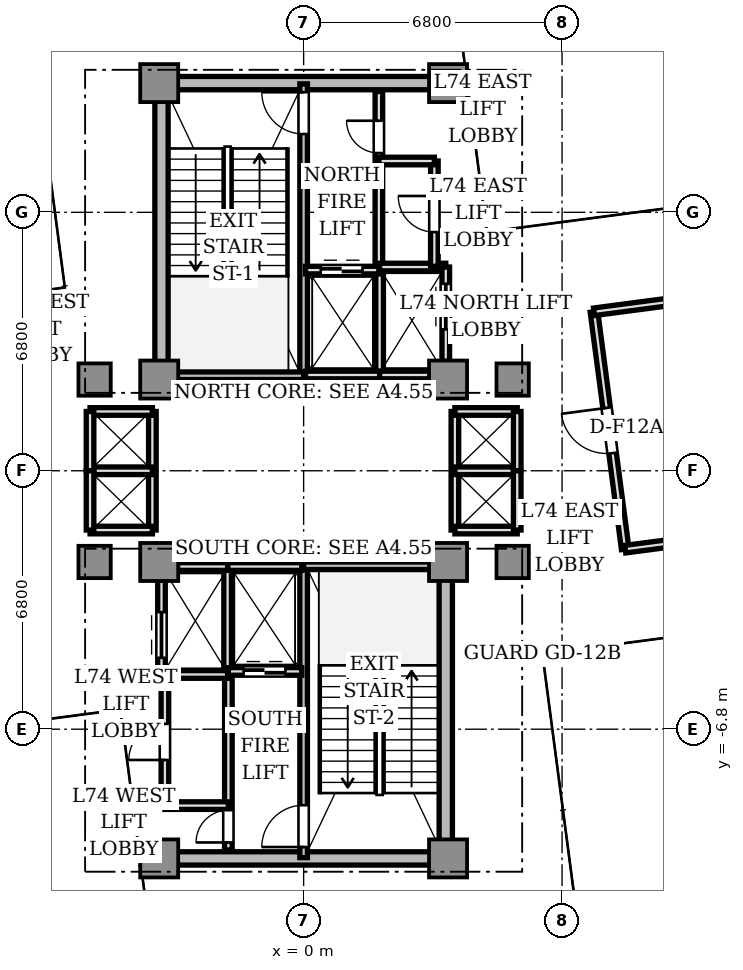
"""IFC4 building model, lengths in metres.
Left out: names, types, materials, properties, quantities, classifications, styles, units other than length and angle.
Written with IfcOpenShell. Run it as: python <this file> out.ifc"""

import sys

from ifc_helpers import new_model, si_unit, direction, frame, frame_2d, origin, origin_2d, place, context, subcontext, project, spatial, rectangle, extrude, source, transform, mapped, element, fill, save


model = new_model("IFC4")
c1 = context("Model", 3, precision=1e-05, world=origin(), true_north=direction((0.0, 1.0)))
c2 = subcontext(c1, "Body", "Model", "MODEL_VIEW")
j1 = project(units=[si_unit("LENGTHUNIT", "METRE"), si_unit("PLANEANGLEUNIT", "RADIAN")], contexts=[c1])
p1 = place(None, origin())
s1 = spatial("IfcSite", under=j1, at=p1, CompositionType="ELEMENT")
p2 = place(p1, origin())
s2 = spatial("IfcBuilding", under=s1, at=p2, CompositionType="ELEMENT")
p3 = place(p2, frame((0.0, 0.0, 264.6)))
s3 = spatial("IfcBuildingStorey", under=s2, at=p3, CompositionType="ELEMENT", Elevation=264.6)
p4 = place(p3, frame((-3.55, 10.2, 0.0), z_axis=(0.0, 0.0, 1.0), x_axis=(1.0, 0.0, 0.0)))
e1 = element("IfcWall", 1, at=p4, inside=s3, PredefinedType="SHEAR", context=c2, shape_type="SweptSolid", body=[
    extrude(rectangle(XDim=7.1, YDim=0.35, at=frame_2d((3.55, 0.0))), origin(), (0.0, 0.0, 1.0), 4.26),
])
p5 = place(p3, frame((-3.74, 2.85, 0.0), z_axis=(0.0, 0.0, 1.0), x_axis=(0.0, 1.0, 0.0)))
e2 = element("IfcWall", 2, at=p5, inside=s3, PredefinedType="SHEAR", context=c2, shape_type="SweptSolid", body=[
    extrude(rectangle(XDim=6.9, YDim=0.35, at=frame_2d((3.45, 0.0))), origin(), (0.0, 0.0, 1.0), 4.26),
])
p6 = place(p3, frame((-3.55, -10.2, 0.0), z_axis=(0.0, 0.0, 1.0), x_axis=(1.0, 0.0, 0.0)))
e3 = element("IfcWall", 3, at=p6, inside=s3, PredefinedType="SHEAR", context=c2, shape_type="SweptSolid", body=[
    extrude(rectangle(XDim=7.1, YDim=0.35, at=frame_2d((3.55, 0.0))), origin(), (0.0, 0.0, 1.0), 4.26),
])
p7 = place(p3, frame((3.74, -9.75, 0.0), z_axis=(0.0, 0.0, 1.0), x_axis=(0.0, 1.0, 0.0)))
e4 = element("IfcWall", 4, at=p7, inside=s3, PredefinedType="SHEAR", context=c2, shape_type="SweptSolid", body=[
    extrude(rectangle(XDim=6.9, YDim=0.35, at=frame_2d((3.45, 0.0))), origin(), (0.0, 0.0, 1.0), 4.26),
])
m1 = source(origin(), c2, "Body", "SweptSolid", [
    extrude(rectangle(XDim=1.0, YDim=1.0, at=origin_2d()), origin(), (0.0, 0.0, 1.0), 4.26),
])
for number, where, z_axis, x_axis in (
    (5, (-3.8, 2.4, 0.0), (0.0, 0.0, 1.0), (1.0, 0.0, 0.0)),
    (6, (3.8, 2.4, 0.0), (0.0, 0.0, 1.0), (1.0, 0.0, 0.0)),
    (7, (-3.8, 10.2, 0.0), (0.0, 0.0, 1.0), (1.0, 0.0, 0.0)),
    (8, (3.8, 10.2, 0.0), (0.0, 0.0, 1.0), (1.0, 0.0, 0.0)),
    (9, (-3.8, -2.4, 0.0), (0.0, 0.0, 1.0), (1.0, 0.0, 0.0)),
    (10, (3.8, -2.4, 0.0), (0.0, 0.0, 1.0), (1.0, 0.0, 0.0)),
    (11, (-3.8, -10.2, 0.0), (0.0, 0.0, 1.0), (1.0, 0.0, 0.0)),
    (12, (3.8, -10.2, 0.0), (0.0, 0.0, 1.0), (1.0, 0.0, 0.0)),
):
    element("IfcColumn", number, at=place(p3, frame(where, z_axis=z_axis, x_axis=x_axis)), inside=s3, PredefinedType="COLUMN", context=c2, shape_type="MappedRepresentation", body=[
        mapped(m1, transform((0.0, 0.0, 0.0), scale=1.0)),
    ])
m2 = source(origin(), c2, "Body", "SweptSolid", [
    extrude(rectangle(XDim=0.85, YDim=0.85, at=origin_2d()), origin(), (0.0, 0.0, 1.0), 4.26),
])
for number, where, z_axis, x_axis in (
    (13, (5.5, 2.4, 0.0), (0.0, 0.0, 1.0), (1.0, 0.0, 0.0)),
    (14, (-5.5, 2.4, 0.0), (0.0, 0.0, 1.0), (1.0, 0.0, 0.0)),
    (15, (5.5, -2.4, 0.0), (0.0, 0.0, 1.0), (1.0, 0.0, 0.0)),
    (16, (-5.5, -2.4, 0.0), (0.0, 0.0, 1.0), (1.0, 0.0, 0.0)),
):
    element("IfcColumn", number, at=place(p3, frame(where, z_axis=z_axis, x_axis=x_axis)), inside=s3, PredefinedType="COLUMN", context=c2, shape_type="MappedRepresentation", body=[
        mapped(m2, transform((0.0, 0.0, 0.0), scale=1.0)),
    ])
p8 = place(p3, frame((0.0, 2.5, 0.0), z_axis=(0.0, 0.0, 1.0), x_axis=(0.0, 1.0, 0.0)))
e17 = element("IfcWall", 17, at=p8, inside=s3, PredefinedType="SOLIDWALL", context=c2, shape_type="SweptSolid", body=[
    extrude(rectangle(XDim=7.68, YDim=0.2, at=frame_2d((3.84, 0.0))), origin(), (0.0, 0.0, 1.0), 4.26),
])
p9 = place(p8, frame((6.36, 0.0, 0.0)))
e18 = element("IfcOpeningElement", 18, at=p9, cuts=e17, PredefinedType="OPENING", context=c2, shape_type="SweptSolid", body=[
    extrude(rectangle(XDim=1.1, YDim=2.15, at=frame_2d((0.55, 1.075))), frame((0.0, 0.11, 0.0), z_axis=(0.0, -1.0, 0.0), x_axis=(1.0, 0.0, 0.0)), (0.0, 0.0, 1.0), 0.22),
])
p10 = place(p3, frame((-3.72, 2.5, 0.0), z_axis=(0.0, 0.0, 1.0), x_axis=(1.0, 0.0, 0.0)))
e19 = element("IfcWall", 19, at=p10, inside=s3, PredefinedType="SOLIDWALL", context=c2, shape_type="SweptSolid", body=[
    extrude(rectangle(XDim=3.72, YDim=0.2, at=frame_2d((1.86, 0.0))), origin(), (0.0, 0.0, 1.0), 4.26),
])
p11 = place(p3, frame((0.0, -10.18, 0.0), z_axis=(0.0, 0.0, 1.0), x_axis=(0.0, 1.0, 0.0)))
e20 = element("IfcWall", 20, at=p11, inside=s3, PredefinedType="SOLIDWALL", context=c2, shape_type="SweptSolid", body=[
    extrude(rectangle(XDim=7.68, YDim=0.2, at=frame_2d((3.84, 0.0))), origin(), (0.0, 0.0, 1.0), 4.26),
])
p12 = place(p11, frame((0.28, 0.0, 0.0)))
e21 = element("IfcOpeningElement", 21, at=p12, cuts=e20, PredefinedType="OPENING", context=c2, shape_type="SweptSolid", body=[
    extrude(rectangle(XDim=1.1, YDim=2.15, at=frame_2d((0.55, 1.075))), frame((0.0, 0.11, 0.0), z_axis=(0.0, -1.0, 0.0), x_axis=(1.0, 0.0, 0.0)), (0.0, 0.0, 1.0), 0.22),
])
p13 = place(p3, frame((0.0, -2.5, 0.0), z_axis=(0.0, 0.0, 1.0), x_axis=(1.0, 0.0, 0.0)))
e22 = element("IfcWall", 22, at=p13, inside=s3, PredefinedType="SOLIDWALL", context=c2, shape_type="SweptSolid", body=[
    extrude(rectangle(XDim=3.72, YDim=0.2, at=frame_2d((1.86, 0.0))), origin(), (0.0, 0.0, 1.0), 4.26),
])
p14 = place(p3, frame((1.98, 5.32, 0.0), z_axis=(0.0, 0.0, 1.0), x_axis=(0.0, 1.0, 0.0)))
e23 = element("IfcWall", 23, at=p14, inside=s3, PredefinedType="SOLIDWALL", context=c2, shape_type="SweptSolid", body=[
    extrude(rectangle(XDim=4.66, YDim=0.2, at=frame_2d((2.33, 0.0))), origin(), (0.0, 0.0, 1.0), 3.81),
])
p15 = place(p14, frame((3.04, 0.0, 0.0)))
e24 = element("IfcOpeningElement", 24, at=p15, cuts=e23, PredefinedType="OPENING", context=c2, shape_type="SweptSolid", body=[
    extrude(rectangle(XDim=0.85, YDim=2.1, at=frame_2d((0.425, 1.05))), frame((0.0, 0.11, 0.0), z_axis=(0.0, -1.0, 0.0), x_axis=(1.0, 0.0, 0.0)), (0.0, 0.0, 1.0), 0.22),
])
p16 = place(p3, frame((-1.98, -9.98, 0.0), z_axis=(0.0, 0.0, 1.0), x_axis=(0.0, 1.0, 0.0)))
e25 = element("IfcWall", 25, at=p16, inside=s3, PredefinedType="SOLIDWALL", context=c2, shape_type="SweptSolid", body=[
    extrude(rectangle(XDim=4.66, YDim=0.2, at=frame_2d((2.33, 0.0))), origin(), (0.0, 0.0, 1.0), 3.81),
])
p17 = place(p16, frame((0.2, 0.0, 0.0)))
e26 = element("IfcOpeningElement", 26, at=p17, cuts=e25, PredefinedType="OPENING", context=c2, shape_type="SweptSolid", body=[
    extrude(rectangle(XDim=0.85, YDim=2.1, at=frame_2d((0.425, 1.05))), frame((0.0, 0.11, 0.0), z_axis=(0.0, -1.0, 0.0), x_axis=(1.0, 0.0, 0.0)), (0.0, 0.0, 1.0), 0.22),
])
p18 = place(p3, frame((2.0, 2.5, 0.0), z_axis=(0.0, 0.0, 1.0), x_axis=(0.0, 1.0, 0.0)))
e27 = element("IfcWall", 27, at=p18, inside=s3, PredefinedType="SOLIDWALL", context=c2, shape_type="SweptSolid", body=[
    extrude(rectangle(XDim=2.78, YDim=0.2, at=frame_2d((1.39, 0.0))), origin(), (0.0, 0.0, 1.0), 3.81),
])
p19 = place(p3, frame((0.05, 2.52, 0.0), z_axis=(0.0, 0.0, 1.0), x_axis=(1.0, 0.0, 0.0)))
e28 = element("IfcWall", 28, at=p19, inside=s3, PredefinedType="SOLIDWALL", context=c2, shape_type="SweptSolid", body=[
    extrude(rectangle(XDim=1.95, YDim=0.2, at=frame_2d((0.975, 0.0))), origin(), (0.0, 0.0, 1.0), 3.81),
])
p20 = place(p3, frame((0.05, 5.28, 0.0), z_axis=(0.0, 0.0, 1.0), x_axis=(1.0, 0.0, 0.0)))
e29 = element("IfcWall", 29, at=p20, inside=s3, PredefinedType="SOLIDWALL", context=c2, shape_type="SweptSolid", body=[
    extrude(rectangle(XDim=1.93, YDim=0.2, at=frame_2d((0.965, 0.0))), origin(), (0.0, 0.0, 1.0), 3.81),
])
p21 = place(p20, frame((0.4, 0.0, 0.0)))
e30 = element("IfcOpeningElement", 30, at=p21, cuts=e29, PredefinedType="OPENING", context=c2, shape_type="SweptSolid", body=[
    extrude(rectangle(XDim=1.1, YDim=2.2, at=frame_2d((0.55, 1.1))), frame((0.0, 0.11, 0.0), z_axis=(0.0, -1.0, 0.0), x_axis=(1.0, 0.0, 0.0)), (0.0, 0.0, 1.0), 0.22),
])
p22 = place(p3, frame((-2.0, -5.28, 0.0), z_axis=(0.0, 0.0, 1.0), x_axis=(0.0, 1.0, 0.0)))
e31 = element("IfcWall", 31, at=p22, inside=s3, PredefinedType="SOLIDWALL", context=c2, shape_type="SweptSolid", body=[
    extrude(rectangle(XDim=2.78, YDim=0.2, at=frame_2d((1.39, 0.0))), origin(), (0.0, 0.0, 1.0), 3.81),
])
p23 = place(p3, frame((-2.0, -2.52, 0.0), z_axis=(0.0, 0.0, 1.0), x_axis=(1.0, 0.0, 0.0)))
e32 = element("IfcWall", 32, at=p23, inside=s3, PredefinedType="SOLIDWALL", context=c2, shape_type="SweptSolid", body=[
    extrude(rectangle(XDim=1.95, YDim=0.2, at=frame_2d((0.975, 0.0))), origin(), (0.0, 0.0, 1.0), 3.81),
])
p24 = place(p3, frame((-1.98, -5.28, 0.0), z_axis=(0.0, 0.0, 1.0), x_axis=(1.0, 0.0, 0.0)))
e33 = element("IfcWall", 33, at=p24, inside=s3, PredefinedType="SOLIDWALL", context=c2, shape_type="SweptSolid", body=[
    extrude(rectangle(XDim=1.93, YDim=0.2, at=frame_2d((0.965, 0.0))), origin(), (0.0, 0.0, 1.0), 3.81),
])
p25 = place(p24, frame((0.4, 0.0, 0.0)))
e34 = element("IfcOpeningElement", 34, at=p25, cuts=e33, PredefinedType="OPENING", context=c2, shape_type="SweptSolid", body=[
    extrude(rectangle(XDim=1.1, YDim=2.2, at=frame_2d((0.55, 1.1))), frame((0.0, 0.11, 0.0), z_axis=(0.0, -1.0, 0.0), x_axis=(1.0, 0.0, 0.0)), (0.0, 0.0, 1.0), 0.22),
])
p26 = place(p3, frame((2.0, 2.52, 0.0), z_axis=(0.0, 0.0, 1.0), x_axis=(1.0, 0.0, 0.0)))
e35 = element("IfcWall", 35, at=p26, inside=s3, PredefinedType="SOLIDWALL", context=c2, shape_type="SweptSolid", body=[
    extrude(rectangle(XDim=1.32, YDim=0.2, at=frame_2d((0.66, 0.0))), origin(), (0.0, 0.0, 1.0), 3.81),
])
p27 = place(p3, frame((2.0, 5.36, 0.0), z_axis=(0.0, 0.0, 1.0), x_axis=(1.0, 0.0, 0.0)))
e36 = element("IfcWall", 36, at=p27, inside=s3, PredefinedType="SOLIDWALL", context=c2, shape_type="SweptSolid", body=[
    extrude(rectangle(XDim=1.74, YDim=0.2, at=frame_2d((0.87, 0.0))), origin(), (0.0, 0.0, 1.0), 3.81),
])
p28 = place(p3, frame((3.74, 2.88, 0.0), z_axis=(0.0, 0.0, 1.0), x_axis=(0.0, 1.0, 0.0)))
e37 = element("IfcWall", 37, at=p28, inside=s3, PredefinedType="SOLIDWALL", context=c2, shape_type="SweptSolid", body=[
    extrude(rectangle(XDim=2.48, YDim=0.2, at=frame_2d((1.24, 0.0))), origin(), (0.0, 0.0, 1.0), 3.81),
])
p29 = place(p28, frame((0.84, 0.0, 0.0)))
e38 = element("IfcOpeningElement", 38, at=p29, cuts=e37, PredefinedType="OPENING", context=c2, shape_type="SweptSolid", body=[
    extrude(rectangle(XDim=1.2, YDim=2.2, at=frame_2d((0.6, 1.1))), frame((0.0, 0.11, 0.0), z_axis=(0.0, -1.0, 0.0), x_axis=(1.0, 0.0, 0.0)), (0.0, 0.0, 1.0), 0.22),
])
p30 = place(p3, frame((-3.32, -2.52, 0.0), z_axis=(0.0, 0.0, 1.0), x_axis=(1.0, 0.0, 0.0)))
e39 = element("IfcWall", 39, at=p30, inside=s3, PredefinedType="SOLIDWALL", context=c2, shape_type="SweptSolid", body=[
    extrude(rectangle(XDim=1.32, YDim=0.2, at=frame_2d((0.66, 0.0))), origin(), (0.0, 0.0, 1.0), 3.81),
])
p31 = place(p3, frame((-3.74, -5.36, 0.0), z_axis=(0.0, 0.0, 1.0), x_axis=(1.0, 0.0, 0.0)))
e40 = element("IfcWall", 40, at=p31, inside=s3, PredefinedType="SOLIDWALL", context=c2, shape_type="SweptSolid", body=[
    extrude(rectangle(XDim=1.74, YDim=0.2, at=frame_2d((0.87, 0.0))), origin(), (0.0, 0.0, 1.0), 3.81),
])
p32 = place(p3, frame((-3.74, -5.36, 0.0), z_axis=(0.0, 0.0, 1.0), x_axis=(0.0, 1.0, 0.0)))
e41 = element("IfcWall", 41, at=p32, inside=s3, PredefinedType="SOLIDWALL", context=c2, shape_type="SweptSolid", body=[
    extrude(rectangle(XDim=2.48, YDim=0.2, at=frame_2d((1.24, 0.0))), origin(), (0.0, 0.0, 1.0), 3.81),
])
p33 = place(p32, frame((0.44, 0.0, 0.0)))
e42 = element("IfcOpeningElement", 42, at=p33, cuts=e41, PredefinedType="OPENING", context=c2, shape_type="SweptSolid", body=[
    extrude(rectangle(XDim=1.2, YDim=2.2, at=frame_2d((0.6, 1.1))), frame((0.0, 0.11, 0.0), z_axis=(0.0, -1.0, 0.0), x_axis=(1.0, 0.0, 0.0)), (0.0, 0.0, 1.0), 0.22),
])
p34 = place(p3, frame((3.98, -1.56, 0.0), z_axis=(0.0, 0.0, 1.0), x_axis=(0.0, 1.0, 0.0)))
e43 = element("IfcWall", 43, at=p34, inside=s3, PredefinedType="SOLIDWALL", context=c2, shape_type="SweptSolid", body=[
    extrude(rectangle(XDim=3.12, YDim=0.2, at=frame_2d((1.56, 0.0))), origin(), (0.0, 0.0, 1.0), 3.48),
])
for number, where, z_axis, x_axis in (
    (44, (3.98, 1.56, 0.0), (0.0, 0.0, 1.0), (1.0, 0.0, 0.0)),
    (45, (3.98, -1.56, 0.0), (0.0, 0.0, 1.0), (1.0, 0.0, 0.0)),
    (46, (3.98, 0.0, 0.0), (0.0, 0.0, 1.0), (1.0, 0.0, 0.0)),
):
    element("IfcWall", number, at=place(p3, frame(where, z_axis=z_axis, x_axis=x_axis)), inside=s3, PredefinedType="SOLIDWALL", context=c2, shape_type="SweptSolid", body=[
        extrude(rectangle(XDim=1.64, YDim=0.2, at=frame_2d((0.82, 0.0))), origin(), (0.0, 0.0, 1.0), 3.81),
    ])
for number, where, z_axis, x_axis in (
    (47, (5.62, 0.0, 0.0), (0.0, 0.0, 1.0), (0.0, 1.0, 0.0)),
    (48, (5.62, -1.56, 0.0), (0.0, 0.0, 1.0), (0.0, 1.0, 0.0)),
):
    element("IfcWall", number, at=place(p3, frame(where, z_axis=z_axis, x_axis=x_axis)), inside=s3, PredefinedType="SOLIDWALL", context=c2, shape_type="SweptSolid", body=[
        extrude(rectangle(XDim=1.56, YDim=0.2, at=frame_2d((0.78, 0.0))), origin(), (0.0, 0.0, 1.0), 3.81),
    ])
p35 = place(p3, frame((-3.98, -1.56, 0.0), z_axis=(0.0, 0.0, 1.0), x_axis=(0.0, 1.0, 0.0)))
e49 = element("IfcWall", 49, at=p35, inside=s3, PredefinedType="SOLIDWALL", context=c2, shape_type="SweptSolid", body=[
    extrude(rectangle(XDim=3.12, YDim=0.2, at=frame_2d((1.56, 0.0))), origin(), (0.0, 0.0, 1.0), 3.48),
])
for number, where, z_axis, x_axis in (
    (50, (-5.62, 1.56, 0.0), (0.0, 0.0, 1.0), (1.0, 0.0, 0.0)),
    (51, (-5.62, -1.56, 0.0), (0.0, 0.0, 1.0), (1.0, 0.0, 0.0)),
    (52, (-5.62, 0.0, 0.0), (0.0, 0.0, 1.0), (1.0, 0.0, 0.0)),
):
    element("IfcWall", number, at=place(p3, frame(where, z_axis=z_axis, x_axis=x_axis)), inside=s3, PredefinedType="SOLIDWALL", context=c2, shape_type="SweptSolid", body=[
        extrude(rectangle(XDim=1.64, YDim=0.2, at=frame_2d((0.82, 0.0))), origin(), (0.0, 0.0, 1.0), 3.81),
    ])
for number, where, z_axis, x_axis in (
    (53, (-5.62, 0.0, 0.0), (0.0, 0.0, 1.0), (0.0, 1.0, 0.0)),
    (54, (-5.62, -1.56, 0.0), (0.0, 0.0, 1.0), (0.0, 1.0, 0.0)),
):
    element("IfcWall", number, at=place(p3, frame(where, z_axis=z_axis, x_axis=x_axis)), inside=s3, PredefinedType="SOLIDWALL", context=c2, shape_type="SweptSolid", body=[
        extrude(rectangle(XDim=1.56, YDim=0.2, at=frame_2d((0.78, 0.0))), origin(), (0.0, 0.0, 1.0), 3.81),
    ])
p36 = place(p3, frame((3.44, 5.38, 0.0), z_axis=(0.0, 0.0, 1.0), x_axis=(0.0, 1.0, 0.0)))
e55 = element("IfcWall", 55, at=p36, inside=s3, PredefinedType="SOLIDWALL", context=c2, shape_type="SweptSolid", body=[
    extrude(rectangle(XDim=2.77, YDim=0.2, at=frame_2d((1.385, 0.0))), origin(), (0.0, 0.0, 1.0), 3.81),
])
p37 = place(p36, frame((0.9, 0.0, 0.0)))
e56 = element("IfcOpeningElement", 56, at=p37, cuts=e55, PredefinedType="OPENING", context=c2, shape_type="SweptSolid", body=[
    extrude(rectangle(XDim=0.95, YDim=2.15, at=frame_2d((0.475, 1.075))), frame((0.0, 0.11, 0.0), z_axis=(0.0, -1.0, 0.0), x_axis=(1.0, 0.0, 0.0)), (0.0, 0.0, 1.0), 0.22),
])
p38 = place(p3, frame((1.98, 8.15, 0.0), z_axis=(0.0, 0.0, 1.0), x_axis=(1.0, 0.0, 0.0)))
e57 = element("IfcWall", 57, at=p38, inside=s3, PredefinedType="SOLIDWALL", context=c2, shape_type="SweptSolid", body=[
    extrude(rectangle(XDim=1.46, YDim=0.2, at=frame_2d((0.73, 0.0))), origin(), (0.0, 0.0, 1.0), 3.81),
])
p39 = place(p3, frame((-3.65, -8.81, 0.0), z_axis=(0.0, 0.0, 1.0), x_axis=(0.0, 1.0, 0.0)))
e58 = element("IfcWall", 58, at=p39, inside=s3, PredefinedType="SOLIDWALL", context=c2, shape_type="SweptSolid", body=[
    extrude(rectangle(XDim=3.43, YDim=0.2, at=frame_2d((1.715, 0.0))), origin(), (0.0, 0.0, 1.0), 3.81),
])
p40 = place(p39, frame((1.2, 0.0, 0.0)))
e59 = element("IfcOpeningElement", 59, at=p40, cuts=e58, PredefinedType="OPENING", context=c2, shape_type="SweptSolid", body=[
    extrude(rectangle(XDim=0.95, YDim=2.15, at=frame_2d((0.475, 1.075))), frame((0.0, 0.11, 0.0), z_axis=(0.0, -1.0, 0.0), x_axis=(1.0, 0.0, 0.0)), (0.0, 0.0, 1.0), 0.22),
])
p41 = place(p3, frame((-3.65, -8.81, 0.0), z_axis=(0.0, 0.0, 1.0), x_axis=(1.0, 0.0, 0.0)))
e60 = element("IfcWall", 60, at=p41, inside=s3, PredefinedType="SOLIDWALL", context=c2, shape_type="SweptSolid", body=[
    extrude(rectangle(XDim=1.67, YDim=0.2, at=frame_2d((0.835, 0.0))), origin(), (0.0, 0.0, 1.0), 3.81),
])
p42 = place(p3, frame((8.462, -2.063, 0.0), z_axis=(0.0, 0.0, 1.0), x_axis=(-0.130518669044, 0.99144585179, 0.0)))
e61 = element("IfcWall", 61, at=p42, inside=s3, PredefinedType="SOLIDWALL", context=c2, shape_type="SweptSolid", body=[
    extrude(rectangle(XDim=6.3, YDim=0.2, at=frame_2d((3.15, 0.0))), origin(), (0.0, 0.0, 1.0), 3.81),
])
p43 = place(p42, frame((2.55, 0.0, 0.0)))
e62 = element("IfcOpeningElement", 62, at=p43, cuts=e61, PredefinedType="OPENING", context=c2, shape_type="SweptSolid", body=[
    extrude(rectangle(XDim=1.2, YDim=2.2, at=frame_2d((0.6, 1.1))), frame((0.0, 0.11, 0.0), z_axis=(0.0, -1.0, 0.0), x_axis=(1.0, 0.0, 0.0)), (0.0, 0.0, 1.0), 0.22),
])
p44 = place(p3, frame((7.639, 4.183, 0.0), z_axis=(0.0, 0.0, 1.0), x_axis=(0.991443337312, 0.130537768098, 0.0)))
e63 = element("IfcWall", 63, at=p44, inside=s3, PredefinedType="SOLIDWALL", context=c2, shape_type="SweptSolid", body=[
    extrude(rectangle(XDim=8.42, YDim=0.2, at=frame_2d((4.21, 0.0))), origin(), (0.0, 0.0, 1.0), 3.81),
])
p45 = place(p3, frame((8.462, -2.063, 0.0), z_axis=(0.0, 0.0, 1.0), x_axis=(0.991443831377, 0.130534015583, 0.0)))
e64 = element("IfcWall", 64, at=p45, inside=s3, PredefinedType="SOLIDWALL", context=c2, shape_type="SweptSolid", body=[
    extrude(rectangle(XDim=8.42, YDim=0.2, at=frame_2d((4.21, 0.0))), origin(), (0.0, 0.0, 1.0), 3.81),
])
m3 = source(origin(), c2, "Body", "SweptSolid", [
    extrude(rectangle(XDim=1.1, YDim=0.05, at=origin_2d()), origin(), (0.0, 0.0, 1.0), 2.15),
])
p46 = place(p9, frame((0.55, 0.0, 0.0)))
e65 = element("IfcDoor", 65, at=p46, inside=s3, OperationType="SINGLE_SWING_RIGHT", PredefinedType="DOOR", context=c2, shape_type="MappedRepresentation", body=[
    mapped(m3, transform((0.0, 0.0, 0.0), scale=1.0)),
])
fill(e18, e65)
p47 = place(p12, frame((0.55, 0.0, 0.0)))
e66 = element("IfcDoor", 66, at=p47, inside=s3, OperationType="SINGLE_SWING_LEFT", PredefinedType="DOOR", context=c2, shape_type="MappedRepresentation", body=[
    mapped(m3, transform((0.0, 0.0, 0.0), scale=1.0)),
])
fill(e21, e66)
m4 = source(origin(), c2, "Body", "SweptSolid", [
    extrude(rectangle(XDim=0.85, YDim=0.05, at=origin_2d()), origin(), (0.0, 0.0, 1.0), 2.1),
])
p48 = place(p15, frame((0.425, 0.0, 0.0)))
e67 = element("IfcDoor", 67, at=p48, inside=s3, OperationType="SINGLE_SWING_RIGHT", PredefinedType="DOOR", context=c2, shape_type="MappedRepresentation", body=[
    mapped(m4, transform((0.0, 0.0, 0.0), scale=1.0)),
])
fill(e24, e67)
p49 = place(p17, frame((0.425, 0.0, 0.0)))
e68 = element("IfcDoor", 68, at=p49, inside=s3, OperationType="SINGLE_SWING_LEFT", PredefinedType="DOOR", context=c2, shape_type="MappedRepresentation", body=[
    mapped(m4, transform((0.0, 0.0, 0.0), scale=1.0)),
])
fill(e26, e68)
m5 = source(origin(), c2, "Body", "SweptSolid", [
    extrude(rectangle(XDim=1.1, YDim=0.05, at=origin_2d()), origin(), (0.0, 0.0, 1.0), 2.2),
])
p50 = place(p21, frame((0.55, 0.0, 0.0)))
e69 = element("IfcDoor", 69, at=p50, inside=s3, OperationType="DOUBLE_DOOR_SLIDING", PredefinedType="DOOR", context=c2, shape_type="MappedRepresentation", body=[
    mapped(m5, transform((0.0, 0.0, 0.0), scale=1.0)),
])
fill(e30, e69)
p51 = place(p25, frame((0.55, 0.0, 0.0)))
e70 = element("IfcDoor", 70, at=p51, inside=s3, OperationType="DOUBLE_DOOR_SLIDING", PredefinedType="DOOR", context=c2, shape_type="MappedRepresentation", body=[
    mapped(m5, transform((0.0, 0.0, 0.0), scale=1.0)),
])
fill(e34, e70)
m6 = source(origin(), c2, "Body", "SweptSolid", [
    extrude(rectangle(XDim=1.2, YDim=0.05, at=origin_2d()), origin(), (0.0, 0.0, 1.0), 2.2),
])
p52 = place(p29, frame((0.6, 0.0, 0.0)))
e71 = element("IfcDoor", 71, at=p52, inside=s3, OperationType="DOUBLE_DOOR_SLIDING", PredefinedType="DOOR", context=c2, shape_type="MappedRepresentation", body=[
    mapped(m6, transform((0.0, 0.0, 0.0), scale=1.0)),
])
fill(e38, e71)
p53 = place(p33, frame((0.6, 0.0, 0.0)))
e72 = element("IfcDoor", 72, at=p53, inside=s3, OperationType="DOUBLE_DOOR_SLIDING", PredefinedType="DOOR", context=c2, shape_type="MappedRepresentation", body=[
    mapped(m6, transform((0.0, 0.0, 0.0), scale=1.0)),
])
fill(e42, e72)
m7 = source(origin(), c2, "Body", "SweptSolid", [
    extrude(rectangle(XDim=0.95, YDim=0.05, at=origin_2d()), origin(), (0.0, 0.0, 1.0), 2.15),
])
p54 = place(p37, frame((0.475, 0.0, 0.0)))
e73 = element("IfcDoor", 73, at=p54, inside=s3, OperationType="SINGLE_SWING_RIGHT", PredefinedType="DOOR", context=c2, shape_type="MappedRepresentation", body=[
    mapped(m7, transform((0.0, 0.0, 0.0), scale=1.0)),
])
fill(e56, e73)
p55 = place(p40, frame((0.475, 0.0, 0.0)))
e74 = element("IfcDoor", 74, at=p55, inside=s3, OperationType="SINGLE_SWING_LEFT", PredefinedType="DOOR", context=c2, shape_type="MappedRepresentation", body=[
    mapped(m7, transform((0.0, 0.0, 0.0), scale=1.0)),
])
fill(e59, e74)
p56 = place(p43, frame((0.6, 0.0, 0.0)))
e75 = element("IfcDoor", 75, at=p56, inside=s3, OperationType="SINGLE_SWING_RIGHT", PredefinedType="DOOR", context=c2, shape_type="MappedRepresentation", body=[
    mapped(m6, transform((0.0, 0.0, 0.0), scale=1.0)),
])
fill(e62, e75)
save(model, sys.argv[1])
